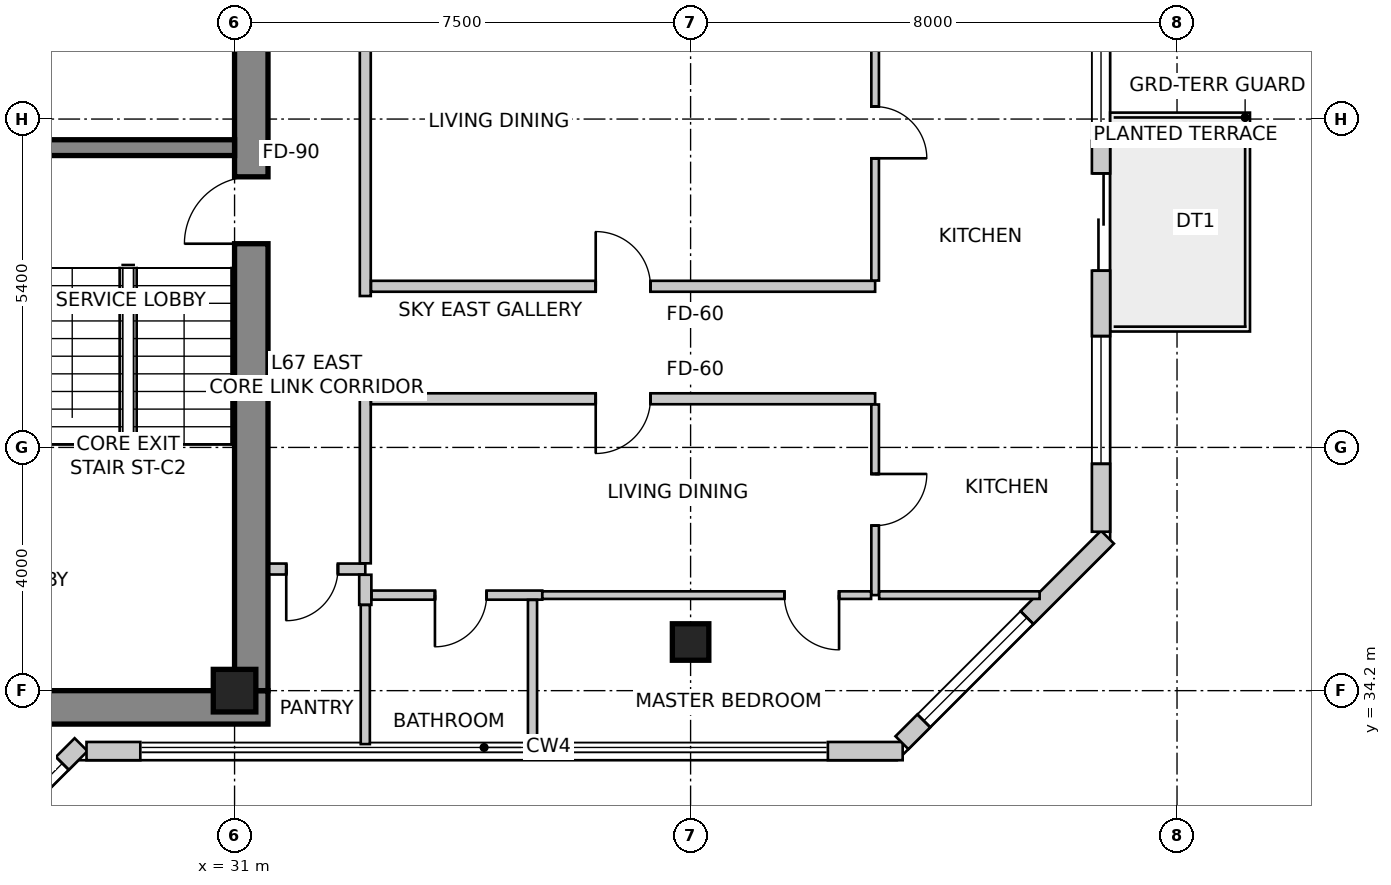
"""IFC4 building model, lengths in metres.
Left out: names, types, materials, properties, quantities, classifications, styles, units other than length and angle.
Written with IfcOpenShell. Run it as: python <this file> out.ifc"""

import sys

from ifc_helpers import new_model, si_unit, direction, frame, frame_2d, origin, origin_2d, place, context, subcontext, project, spatial, rectangle, extrude, source, transform, mapped, element, fill, save


model = new_model("IFC4")
c1 = context("Model", 3, precision=1e-05, world=origin(), true_north=direction((0.0, 1.0)))
c2 = subcontext(c1, "Body", "Model", "MODEL_VIEW")
j1 = project(units=[si_unit("LENGTHUNIT", "METRE"), si_unit("PLANEANGLEUNIT", "RADIAN")], contexts=[c1])
p1 = place(None, origin())
s1 = spatial("IfcSite", under=j1, at=p1, CompositionType="ELEMENT")
p2 = place(p1, origin())
s2 = spatial("IfcBuilding", under=s1, at=p2, CompositionType="ELEMENT")
p3 = place(p2, frame((0.0, 0.0, 263.7)))
s3 = spatial("IfcBuildingStorey", under=s2, at=p3, CompositionType="ELEMENT", Elevation=263.7)
p4 = place(p3, frame((16.05, 33.925, 0.0), z_axis=(0.0, 0.0, 1.0), x_axis=(1.0, 0.0, 0.0)))
e1 = element("IfcWall", 1, at=p4, inside=s3, PredefinedType="SHEAR", context=c2, shape_type="SweptSolid", body=[
    extrude(rectangle(XDim=15.5, YDim=0.55, at=frame_2d((7.75, 0.0))), origin(), (0.0, 0.0, 1.0), 3.6),
])
m1 = source(origin(), c2, "Body", "SweptSolid", [
    extrude(rectangle(XDim=1.1, YDim=2.15, at=frame_2d((0.55, 1.075))), frame((0.0, 0.285, 0.0), z_axis=(0.0, -1.0, 0.0), x_axis=(1.0, 0.0, 0.0)), (0.0, 0.0, 1.0), 0.57),
])
p5 = place(p4, frame((9.98, 0.0, 0.0)))
e2 = element("IfcOpeningElement", 2, at=p5, cuts=e1, PredefinedType="OPENING", context=c2, shape_type="MappedRepresentation", body=[
    mapped(m1, transform((0.0, 0.0, 0.0), scale=1.0)),
])
p6 = place(p3, frame((31.275, 34.2, 0.0), z_axis=(0.0, 0.0, 1.0), x_axis=(0.0, 1.0, 0.0)))
e3 = element("IfcWall", 3, at=p6, inside=s3, PredefinedType="SHEAR", context=c2, shape_type="SweptSolid", body=[
    extrude(rectangle(XDim=11.4, YDim=0.55, at=frame_2d((5.7, 0.0))), origin(), (0.0, 0.0, 1.0), 3.6),
])
p7 = place(p6, frame((7.35, 0.0, 0.0)))
e4 = element("IfcOpeningElement", 4, at=p7, cuts=e3, PredefinedType="OPENING", context=c2, shape_type="MappedRepresentation", body=[
    mapped(m1, transform((0.0, 0.0, 0.0), scale=1.0)),
])
p8 = place(p3, frame((27.5, 43.13, 0.0), z_axis=(0.0, 0.0, 1.0), x_axis=(1.0, 0.0, 0.0)))
e5 = element("IfcWall", 5, at=p8, inside=s3, PredefinedType="SHEAR", context=c2, shape_type="SweptSolid", body=[
    extrude(rectangle(XDim=3.5, YDim=0.26, at=frame_2d((1.75, 0.0))), origin(), (0.0, 0.0, 1.0), 3.6),
])
m2 = source(origin(), c2, "Body", "SweptSolid", [
    extrude(rectangle(XDim=0.7, YDim=0.7, at=origin_2d()), origin(), (0.0, 0.0, 1.0), 3.6),
])
p9 = place(p3, frame((31.0, 34.2, 0.0), z_axis=(0.0, 0.0, 1.0), x_axis=(1.0, 0.0, 0.0)))
e6 = element("IfcColumn", 6, at=p9, inside=s3, PredefinedType="COLUMN", context=c2, shape_type="MappedRepresentation", body=[
    mapped(m2, transform((0.0, 0.0, 0.0), scale=1.0)),
])
m3 = source(origin(), c2, "Body", "SweptSolid", [
    extrude(rectangle(XDim=0.6, YDim=0.6, at=origin_2d()), origin(), (0.0, 0.0, 1.0), 3.6),
])
p10 = place(p3, frame((38.5, 35.0, 0.0), z_axis=(0.0, 0.0, 1.0), x_axis=(1.0, 0.0, 0.0)))
e7 = element("IfcColumn", 7, at=p10, inside=s3, PredefinedType="COLUMN", context=c2, shape_type="MappedRepresentation", body=[
    mapped(m3, transform((0.0, 0.0, 0.0), scale=1.0)),
])
p11 = place(p3, frame((26.42, 31.256, 0.0), z_axis=(0.0, 0.0, 1.0), x_axis=(0.707106781187, 0.707106781187, 0.0)))
e8 = element("IfcWall", 8, at=p11, inside=s3, PredefinedType="SOLIDWALL", context=c2, shape_type="SweptSolid", body=[
    extrude(rectangle(XDim=2.907, YDim=0.3, at=frame_2d((1.454, 0.0))), origin(), (0.0, 0.0, 1.0), 3.35),
])
m4 = source(origin(), c2, "Body", "SweptSolid", [
    extrude(rectangle(XDim=1.2, YDim=1.6, at=frame_2d((0.6, 0.8))), frame((0.0, 0.16, 0.0), z_axis=(0.0, -1.0, 0.0), x_axis=(1.0, 0.0, 0.0)), (0.0, 0.0, 1.0), 0.32),
])
p12 = place(p11, frame((1.272, 0.0, 0.85)))
e9 = element("IfcOpeningElement", 9, at=p12, cuts=e8, PredefinedType="OPENING", context=c2, shape_type="MappedRepresentation", body=[
    mapped(m4, transform((0.0, 0.0, 0.0), scale=1.0)),
])
p13 = place(p3, frame((28.565, 33.206, 0.0), z_axis=(0.0, 0.0, 1.0), x_axis=(1.0, 0.0, 0.0)))
e10 = element("IfcWall", 10, at=p13, inside=s3, PredefinedType="SOLIDWALL", context=c2, shape_type="SweptSolid", body=[
    extrude(rectangle(XDim=0.885, YDim=0.3, at=frame_2d((0.442, 0.0))), origin(), (0.0, 0.0, 1.0), 3.35),
])
p14 = place(p3, frame((40.758, 33.206, 0.0), z_axis=(0.0, 0.0, 1.0), x_axis=(1.0, 0.0, 0.0)))
e11 = element("IfcWall", 11, at=p14, inside=s3, PredefinedType="SOLIDWALL", context=c2, shape_type="SweptSolid", body=[
    extrude(rectangle(XDim=1.23, YDim=0.3, at=frame_2d((0.615, 0.0))), origin(), (0.0, 0.0, 1.0), 3.35),
])
p15 = place(p3, frame((41.976, 33.344, 0.0), z_axis=(0.0, 0.0, 1.0), x_axis=(0.707132316343, 0.707081245108, 0.0)))
e12 = element("IfcWall", 12, at=p15, inside=s3, PredefinedType="SOLIDWALL", context=c2, shape_type="SweptSolid", body=[
    extrude(rectangle(XDim=4.78, YDim=0.3, at=frame_2d((2.39, 0.0))), origin(), (0.0, 0.0, 1.0), 3.35),
])
m5 = source(origin(), c2, "Body", "SweptSolid", [
    extrude(rectangle(XDim=2.4, YDim=2.2, at=frame_2d((1.2, 1.1))), frame((0.0, 0.16, 0.0), z_axis=(0.0, -1.0, 0.0), x_axis=(1.0, 0.0, 0.0)), (0.0, 0.0, 1.0), 0.32),
])
p16 = place(p15, frame((0.509, 0.0, 0.85)))
e13 = element("IfcOpeningElement", 13, at=p16, cuts=e12, PredefinedType="OPENING", context=c2, shape_type="MappedRepresentation", body=[
    mapped(m5, transform((0.0, 0.0, 0.0), scale=1.0)),
])
p17 = place(p3, frame((45.25, 36.813, 0.0), z_axis=(0.0, 0.0, 1.0), x_axis=(0.0, 1.0, 0.0)))
e14 = element("IfcWall", 14, at=p17, inside=s3, PredefinedType="SOLIDWALL", context=c2, shape_type="SweptSolid", body=[
    extrude(rectangle(XDim=10.531, YDim=0.3, at=frame_2d((5.265, 0.0))), origin(), (0.0, 0.0, 1.0), 3.35),
])
m6 = source(origin(), c2, "Body", "SweptSolid", [
    extrude(rectangle(XDim=1.6, YDim=2.15, at=frame_2d((0.8, 1.075))), frame((0.0, 0.16, 0.0), z_axis=(0.0, -1.0, 0.0), x_axis=(1.0, 0.0, 0.0)), (0.0, 0.0, 1.0), 0.32),
])
p18 = place(p17, frame((4.293, 0.0, 0.0)))
e15 = element("IfcOpeningElement", 15, at=p18, cuts=e14, PredefinedType="OPENING", context=c2, shape_type="MappedRepresentation", body=[
    mapped(m6, transform((0.0, 0.0, 0.0), scale=1.0)),
])
m7 = source(origin(), c2, "Body", "SweptSolid", [
    extrude(rectangle(XDim=2.1, YDim=2.0, at=frame_2d((1.05, 1.0))), frame((0.0, 0.16, 0.0), z_axis=(0.0, -1.0, 0.0), x_axis=(1.0, 0.0, 0.0)), (0.0, 0.0, 1.0), 0.32),
])
p19 = place(p17, frame((1.117, 0.0, 0.85)))
e16 = element("IfcOpeningElement", 16, at=p19, cuts=e14, PredefinedType="OPENING", context=c2, shape_type="MappedRepresentation", body=[
    mapped(m7, transform((0.0, 0.0, 0.0), scale=1.0)),
])
p20 = place(p17, frame((6.427, 0.0, 0.85)))
e17 = element("IfcOpeningElement", 17, at=p20, cuts=e14, PredefinedType="OPENING", context=c2, shape_type="MappedRepresentation", body=[
    mapped(m7, transform((0.0, 0.0, 0.0), scale=1.0)),
])
p21 = place(p3, frame((33.15, 36.2, 0.0), z_axis=(0.0, 0.0, 1.0), x_axis=(-1.0, 0.0, 0.0)))
e18 = element("IfcWall", 18, at=p21, inside=s3, PredefinedType="PARTITIONING", context=c2, shape_type="SweptSolid", body=[
    extrude(rectangle(XDim=1.58, YDim=0.18, at=frame_2d((0.79, 0.0))), origin(), (0.0, 0.0, 1.0), 3.35),
])
m8 = source(origin(), c2, "Body", "SweptSolid", [
    extrude(rectangle(XDim=0.85, YDim=2.15, at=frame_2d((0.425, 1.075))), frame((0.0, 0.1, 0.0), z_axis=(0.0, -1.0, 0.0), x_axis=(1.0, 0.0, 0.0)), (0.0, 0.0, 1.0), 0.2),
])
p22 = place(p21, frame((0.45, 0.0, 0.0)))
e19 = element("IfcOpeningElement", 19, at=p22, cuts=e18, PredefinedType="OPENING", context=c2, shape_type="MappedRepresentation", body=[
    mapped(m8, transform((0.0, 0.0, 0.0), scale=1.0)),
])
p23 = place(p3, frame((33.15, 45.975, 0.0), z_axis=(0.0, 0.0, 1.0), x_axis=(0.0, -1.0, 0.0)))
e20 = element("IfcWall", 20, at=p23, inside=s3, PredefinedType="PARTITIONING", context=c2, shape_type="SweptSolid", body=[
    extrude(rectangle(XDim=5.285, YDim=0.18, at=frame_2d((2.643, 0.0))), origin(), (0.0, 0.0, 1.0), 2.879),
])
p24 = place(p3, frame((33.15, 39.16, 0.0), z_axis=(0.0, 0.0, 1.0), x_axis=(0.0, -1.0, 0.0)))
e21 = element("IfcWall", 21, at=p24, inside=s3, PredefinedType="PARTITIONING", context=c2, shape_type="SweptSolid", body=[
    extrude(rectangle(XDim=2.866, YDim=0.18, at=frame_2d((1.433, 0.0))), origin(), (0.0, 0.0, 1.0), 3.35),
])
p25 = place(p3, frame((33.244, 40.85, 0.0), z_axis=(0.0, 0.0, 1.0), x_axis=(1.0, 0.0, 0.0)))
e22 = element("IfcWall", 22, at=p25, inside=s3, PredefinedType="PARTITIONING", context=c2, shape_type="SweptSolid", body=[
    extrude(rectangle(XDim=8.291, YDim=0.18, at=frame_2d((4.146, 0.0))), origin(), (0.0, 0.0, 1.0), 2.979),
])
m9 = source(origin(), c2, "Body", "SweptSolid", [
    extrude(rectangle(XDim=0.9, YDim=2.15, at=frame_2d((0.45, 1.075))), frame((0.0, 0.1, 0.0), z_axis=(0.0, -1.0, 0.0), x_axis=(1.0, 0.0, 0.0)), (0.0, 0.0, 1.0), 0.2),
])
p26 = place(p25, frame((3.696, 0.0, 0.0)))
e23 = element("IfcOpeningElement", 23, at=p26, cuts=e22, PredefinedType="OPENING", context=c2, shape_type="MappedRepresentation", body=[
    mapped(m9, transform((0.0, 0.0, 0.0), scale=1.0)),
])
p27 = place(p3, frame((41.535, 39.0, 0.0), z_axis=(0.0, 0.0, 1.0), x_axis=(-1.0, 0.0, 0.0)))
e24 = element("IfcWall", 24, at=p27, inside=s3, PredefinedType="PARTITIONING", context=c2, shape_type="SweptSolid", body=[
    extrude(rectangle(XDim=8.291, YDim=0.18, at=frame_2d((4.146, 0.0))), origin(), (0.0, 0.0, 1.0), 2.979),
])
p28 = place(p27, frame((3.696, 0.0, 0.0)))
e25 = element("IfcOpeningElement", 25, at=p28, cuts=e24, PredefinedType="OPENING", context=c2, shape_type="MappedRepresentation", body=[
    mapped(m9, transform((0.0, 0.0, 0.0), scale=1.0)),
])
p29 = place(p3, frame((33.15, 36.106, 0.0), z_axis=(0.0, 0.0, 1.0), x_axis=(0.0, -1.0, 0.0)))
e26 = element("IfcWall", 26, at=p29, inside=s3, PredefinedType="PARTITIONING", context=c2, shape_type="SweptSolid", body=[
    extrude(rectangle(XDim=0.495, YDim=0.2, at=frame_2d((0.248, 0.0))), origin(), (0.0, 0.0, 1.0), 3.35),
])
p30 = place(p3, frame((33.15, 35.609, 0.0), z_axis=(0.0, 0.0, 1.0), x_axis=(0.0, -1.0, 0.0)))
e27 = element("IfcWall", 27, at=p30, inside=s3, PredefinedType="PARTITIONING", context=c2, shape_type="SweptSolid", body=[
    extrude(rectangle(XDim=2.288, YDim=0.15, at=frame_2d((1.144, 0.0))), origin(), (0.0, 0.0, 1.0), 3.35),
])
p31 = place(p3, frame((41.535, 45.815, 0.0), z_axis=(0.0, 0.0, 1.0), x_axis=(0.0, -1.0, 0.0)))
e28 = element("IfcWall", 28, at=p31, inside=s3, PredefinedType="PARTITIONING", context=c2, shape_type="SweptSolid", body=[
    extrude(rectangle(XDim=4.871, YDim=0.125, at=frame_2d((2.436, 0.0))), origin(), (0.0, 0.0, 1.0), 3.35),
])
m10 = source(origin(), c2, "Body", "SweptSolid", [
    extrude(rectangle(XDim=0.85, YDim=2.15, at=frame_2d((0.425, 1.075))), frame((0.0, 0.073, 0.0), z_axis=(0.0, -1.0, 0.0), x_axis=(1.0, 0.0, 0.0)), (0.0, 0.0, 1.0), 0.145),
])
p32 = place(p31, frame((2.01, 0.0, 0.0)))
e29 = element("IfcOpeningElement", 29, at=p32, cuts=e28, PredefinedType="OPENING", context=c2, shape_type="MappedRepresentation", body=[
    mapped(m10, transform((0.0, 0.0, 0.0), scale=1.0)),
])
p33 = place(p3, frame((41.535, 38.906, 0.0), z_axis=(0.0, 0.0, 1.0), x_axis=(0.0, -1.0, 0.0)))
e30 = element("IfcWall", 30, at=p33, inside=s3, PredefinedType="PARTITIONING", context=c2, shape_type="SweptSolid", body=[
    extrude(rectangle(XDim=3.135, YDim=0.125, at=frame_2d((1.567, 0.0))), origin(), (0.0, 0.0, 1.0), 3.35),
])
p34 = place(p33, frame((1.143, 0.0, 0.0)))
e31 = element("IfcOpeningElement", 31, at=p34, cuts=e30, PredefinedType="OPENING", context=c2, shape_type="MappedRepresentation", body=[
    mapped(m10, transform((0.0, 0.0, 0.0), scale=1.0)),
])
p35 = place(p3, frame((36.06, 35.771, 0.0), z_axis=(0.0, 0.0, 1.0), x_axis=(-1.0, 0.0, 0.0)))
e32 = element("IfcWall", 32, at=p35, inside=s3, PredefinedType="PARTITIONING", context=c2, shape_type="SweptSolid", body=[
    extrude(rectangle(XDim=2.806, YDim=0.15, at=frame_2d((1.403, 0.0))), origin(), (0.0, 0.0, 1.0), 3.35),
])
m11 = source(origin(), c2, "Body", "SweptSolid", [
    extrude(rectangle(XDim=0.85, YDim=2.15, at=frame_2d((0.425, 1.075))), frame((0.0, 0.085, 0.0), z_axis=(0.0, -1.0, 0.0), x_axis=(1.0, 0.0, 0.0)), (0.0, 0.0, 1.0), 0.17),
])
p36 = place(p35, frame((0.915, 0.0, 0.0)))
e33 = element("IfcOpeningElement", 33, at=p36, cuts=e32, PredefinedType="OPENING", context=c2, shape_type="MappedRepresentation", body=[
    mapped(m11, transform((0.0, 0.0, 0.0), scale=1.0)),
])
p37 = place(p3, frame((41.469, 35.771, 0.0), z_axis=(0.0, 0.0, 1.0), x_axis=(-1.0, 0.0, 0.0)))
e34 = element("IfcWall", 34, at=p37, inside=s3, PredefinedType="PARTITIONING", context=c2, shape_type="SweptSolid", body=[
    extrude(rectangle(XDim=5.406, YDim=0.125, at=frame_2d((2.703, 0.0))), origin(), (0.0, 0.0, 1.0), 2.979),
])
m12 = source(origin(), c2, "Body", "SweptSolid", [
    extrude(rectangle(XDim=0.9, YDim=2.15, at=frame_2d((0.45, 1.075))), frame((0.0, 0.073, 0.0), z_axis=(0.0, -1.0, 0.0), x_axis=(1.0, 0.0, 0.0)), (0.0, 0.0, 1.0), 0.145),
])
p38 = place(p37, frame((0.527, 0.0, 0.0)))
e35 = element("IfcOpeningElement", 35, at=p38, cuts=e34, PredefinedType="OPENING", context=c2, shape_type="MappedRepresentation", body=[
    mapped(m12, transform((0.0, 0.0, 0.0), scale=1.0)),
])
p39 = place(p3, frame((44.24, 35.771, 0.0), z_axis=(0.0, 0.0, 1.0), x_axis=(-1.0, 0.0, 0.0)))
e36 = element("IfcWall", 36, at=p39, inside=s3, PredefinedType="PARTITIONING", context=c2, shape_type="SweptSolid", body=[
    extrude(rectangle(XDim=2.639, YDim=0.125, at=frame_2d((1.319, 0.0))), origin(), (0.0, 0.0, 1.0), 3.35),
])
p40 = place(p3, frame((35.9, 35.692, 0.0), z_axis=(0.0, 0.0, 1.0), x_axis=(0.0, -1.0, 0.0)))
e37 = element("IfcWall", 37, at=p40, inside=s3, PredefinedType="PARTITIONING", context=c2, shape_type="SweptSolid", body=[
    extrude(rectangle(XDim=2.371, YDim=0.15, at=frame_2d((1.186, 0.0))), origin(), (0.0, 0.0, 1.0), 3.35),
])
m13 = source(origin(), c2, "Body", "SweptSolid", [
    extrude(rectangle(XDim=1.2, YDim=1.6, at=frame_2d((0.6, 0.8))), frame((0.0, -0.015, 0.0), z_axis=(0.0, -1.0, 0.0), x_axis=(1.0, 0.0, 0.0)), (0.0, 0.0, 1.0), 0.06),
])
p41 = place(p12, origin())
e38 = element("IfcWindow", 38, at=p41, inside=s3, PartitioningType="SINGLE_PANEL", PredefinedType="WINDOW", context=c2, shape_type="MappedRepresentation", body=[
    mapped(m13, transform((0.0, 0.0, 0.0), scale=1.0)),
])
fill(e9, e38)
m14 = source(origin(), c2, "Body", "SweptSolid", [
    extrude(rectangle(XDim=2.4, YDim=2.2, at=frame_2d((1.2, 1.1))), frame((0.0, -0.015, 0.0), z_axis=(0.0, -1.0, 0.0), x_axis=(1.0, 0.0, 0.0)), (0.0, 0.0, 1.0), 0.06),
])
p42 = place(p16, origin())
e39 = element("IfcWindow", 39, at=p42, inside=s3, PartitioningType="SINGLE_PANEL", PredefinedType="WINDOW", context=c2, shape_type="MappedRepresentation", body=[
    mapped(m14, transform((0.0, 0.0, 0.0), scale=1.0)),
])
fill(e13, e39)
m15 = source(origin(), c2, "Body", "SweptSolid", [
    extrude(rectangle(XDim=1.6, YDim=2.15, at=frame_2d((0.8, 1.075))), frame((0.0, 0.025, 0.0), z_axis=(0.0, -1.0, 0.0), x_axis=(1.0, 0.0, 0.0)), (0.0, 0.0, 1.0), 0.05),
])
p43 = place(p18, origin())
e40 = element("IfcDoor", 40, at=p43, inside=s3, OperationType="DOUBLE_DOOR_SLIDING", PredefinedType="DOOR", context=c2, shape_type="MappedRepresentation", body=[
    mapped(m15, transform((0.0, 0.0, 0.0), scale=1.0)),
])
fill(e15, e40)
m16 = source(origin(), c2, "Body", "SweptSolid", [
    extrude(rectangle(XDim=2.1, YDim=2.0, at=frame_2d((1.05, 1.0))), frame((0.0, -0.015, 0.0), z_axis=(0.0, -1.0, 0.0), x_axis=(1.0, 0.0, 0.0)), (0.0, 0.0, 1.0), 0.06),
])
p44 = place(p19, origin())
e41 = element("IfcWindow", 41, at=p44, inside=s3, PartitioningType="SINGLE_PANEL", PredefinedType="WINDOW", context=c2, shape_type="MappedRepresentation", body=[
    mapped(m16, transform((0.0, 0.0, 0.0), scale=1.0)),
])
fill(e16, e41)
p45 = place(p20, origin())
e42 = element("IfcWindow", 42, at=p45, inside=s3, PartitioningType="SINGLE_PANEL", PredefinedType="WINDOW", context=c2, shape_type="MappedRepresentation", body=[
    mapped(m16, transform((0.0, 0.0, 0.0), scale=1.0)),
])
fill(e17, e42)
m17 = source(origin(), c2, "Body", "SweptSolid", [
    extrude(rectangle(XDim=1.1, YDim=2.15, at=frame_2d((0.55, 1.075))), frame((0.0, 0.025, 0.0), z_axis=(0.0, -1.0, 0.0), x_axis=(1.0, 0.0, 0.0)), (0.0, 0.0, 1.0), 0.05),
])
p46 = place(p7, origin())
e43 = element("IfcDoor", 43, at=p46, inside=s3, OperationType="SINGLE_SWING_LEFT", PredefinedType="DOOR", context=c2, shape_type="MappedRepresentation", body=[
    mapped(m17, transform((0.0, 0.0, 0.0), scale=1.0)),
])
fill(e4, e43)
m18 = source(origin(), c2, "Body", "SweptSolid", [
    extrude(rectangle(XDim=0.85, YDim=2.15, at=frame_2d((0.425, 1.075))), frame((0.0, 0.025, 0.0), z_axis=(0.0, -1.0, 0.0), x_axis=(1.0, 0.0, 0.0)), (0.0, 0.0, 1.0), 0.05),
])
p47 = place(p22, origin())
e44 = element("IfcDoor", 44, at=p47, inside=s3, OperationType="SINGLE_SWING_RIGHT", PredefinedType="DOOR", context=c2, shape_type="MappedRepresentation", body=[
    mapped(m18, transform((0.0, 0.0, 0.0), scale=1.0)),
])
fill(e19, e44)
m19 = source(origin(), c2, "Body", "SweptSolid", [
    extrude(rectangle(XDim=0.9, YDim=2.15, at=frame_2d((0.45, 1.075))), frame((0.0, 0.025, 0.0), z_axis=(0.0, -1.0, 0.0), x_axis=(1.0, 0.0, 0.0)), (0.0, 0.0, 1.0), 0.05),
])
p48 = place(p26, origin())
e45 = element("IfcDoor", 45, at=p48, inside=s3, OperationType="SINGLE_SWING_LEFT", PredefinedType="DOOR", context=c2, shape_type="MappedRepresentation", body=[
    mapped(m19, transform((0.0, 0.0, 0.0), scale=1.0)),
])
fill(e23, e45)
p49 = place(p32, origin())
e46 = element("IfcDoor", 46, at=p49, inside=s3, OperationType="SINGLE_SWING_RIGHT", PredefinedType="DOOR", context=c2, shape_type="MappedRepresentation", body=[
    mapped(m18, transform((0.0, 0.0, 0.0), scale=1.0)),
])
fill(e29, e46)
p50 = place(p28, origin())
e47 = element("IfcDoor", 47, at=p50, inside=s3, OperationType="SINGLE_SWING_RIGHT", PredefinedType="DOOR", context=c2, shape_type="MappedRepresentation", body=[
    mapped(m19, transform((0.0, 0.0, 0.0), scale=1.0)),
])
fill(e25, e47)
p51 = place(p34, origin())
e48 = element("IfcDoor", 48, at=p51, inside=s3, OperationType="SINGLE_SWING_LEFT", PredefinedType="DOOR", context=c2, shape_type="MappedRepresentation", body=[
    mapped(m18, transform((0.0, 0.0, 0.0), scale=1.0)),
])
fill(e31, e48)
p52 = place(p36, origin())
e49 = element("IfcDoor", 49, at=p52, inside=s3, OperationType="SINGLE_SWING_RIGHT", PredefinedType="DOOR", context=c2, shape_type="MappedRepresentation", body=[
    mapped(m18, transform((0.0, 0.0, 0.0), scale=1.0)),
])
fill(e33, e49)
m20 = source(origin(), c2, "Body", "SweptSolid", [
    extrude(rectangle(XDim=0.9, YDim=2.15, at=frame_2d((0.45, 1.075))), frame((0.0, 0.025, 0.0), z_axis=(0.0, -1.0, 0.0), x_axis=(1.0, 0.0, 0.0)), (0.0, 0.0, 1.0), 0.05),
])
p53 = place(p38, origin())
e50 = element("IfcDoor", 50, at=p53, inside=s3, OperationType="SINGLE_SWING_LEFT", PredefinedType="DOOR", context=c2, shape_type="MappedRepresentation", body=[
    mapped(m20, transform((0.0, 0.0, 0.0), scale=1.0)),
])
fill(e35, e50)
save(model, sys.argv[1])
